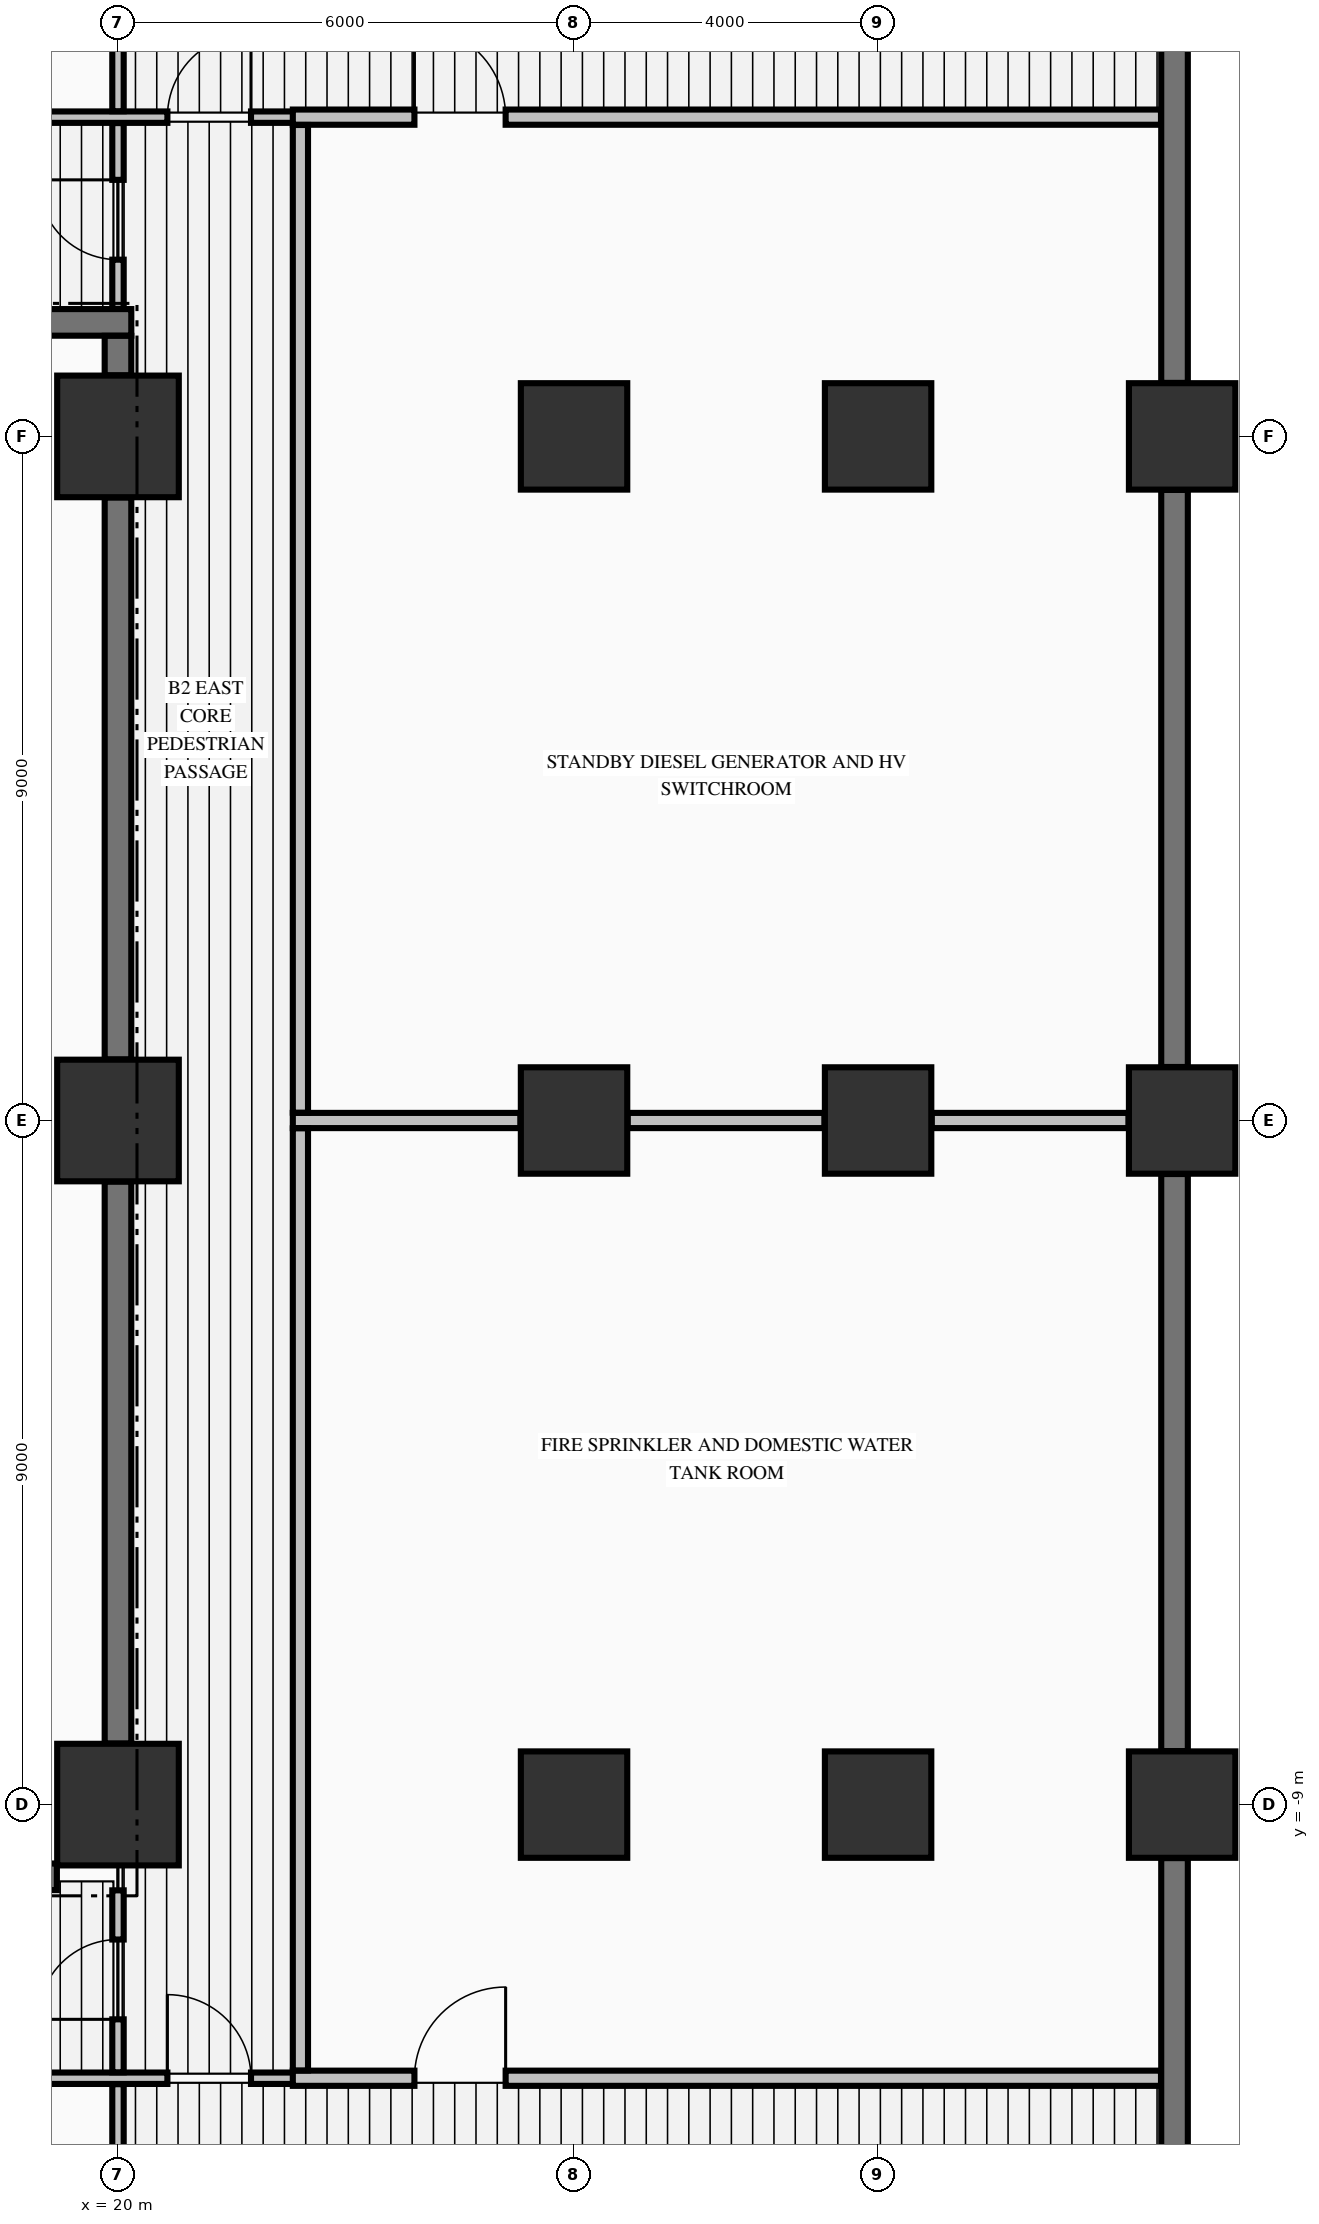
"""IFC4 building model, lengths in metres.
Left out: names, types, materials, properties, quantities, classifications, styles, units other than length and angle.
Written with IfcOpenShell. Run it as: python <this file> out.ifc"""

import sys

from ifc_helpers import new_model, si_unit, direction, frame, frame_2d, origin, origin_2d, place, context, subcontext, project, spatial, rectangle, extrude, element, fill, save


model = new_model("IFC4")
c1 = context("Model", 3, precision=1e-05, world=origin(), true_north=direction((0.0, 1.0)))
c2 = subcontext(c1, "Body", "Model", "MODEL_VIEW")
j1 = project(units=[si_unit("LENGTHUNIT", "METRE"), si_unit("PLANEANGLEUNIT", "RADIAN")], contexts=[c1])
p1 = place(None, origin())
s1 = spatial("IfcSite", under=j1, at=p1, CompositionType="ELEMENT")
p2 = place(p1, origin())
s2 = spatial("IfcBuilding", under=s1, at=p2, CompositionType="ELEMENT")
p3 = place(p2, frame((0.0, 0.0, -9.1)))
s3 = spatial("IfcBuildingStorey", under=s2, at=p3, CompositionType="ELEMENT", Elevation=-9.1)
for number, where, z_axis, x_axis in (
    (1, (20.0, -9.0, -0.45), (0.0, 0.0, 1.0), (1.0, 0.0, 0.0)),
    (2, (20.0, 0.0, -0.45), (0.0, 0.0, 1.0), (1.0, 0.0, 0.0)),
    (3, (20.0, 9.0, -0.45), (0.0, 0.0, 1.0), (1.0, 0.0, 0.0)),
):
    element("IfcColumn", number, at=place(p3, frame(where, z_axis=z_axis, x_axis=x_axis)), inside=s3, PredefinedType="COLUMN", context=c2, shape_type="SweptSolid", body=[
        extrude(rectangle(XDim=1.6, YDim=1.6, at=origin_2d()), origin(), (0.0, 0.0, 1.0), 4.65),
    ])
for number, where, z_axis, x_axis in (
    (4, (26.0, -9.0, -0.45), (0.0, 0.0, 1.0), (1.0, 0.0, 0.0)),
    (5, (26.0, 0.0, -0.45), (0.0, 0.0, 1.0), (1.0, 0.0, 0.0)),
    (6, (26.0, 9.0, -0.45), (0.0, 0.0, 1.0), (1.0, 0.0, 0.0)),
    (7, (30.0, -9.0, -0.45), (0.0, 0.0, 1.0), (1.0, 0.0, 0.0)),
    (8, (30.0, 0.0, -0.45), (0.0, 0.0, 1.0), (1.0, 0.0, 0.0)),
    (9, (30.0, 9.0, -0.45), (0.0, 0.0, 1.0), (1.0, 0.0, 0.0)),
    (10, (34.0, -9.0, -0.45), (0.0, 0.0, 1.0), (1.0, 0.0, 0.0)),
    (11, (34.0, 0.0, -0.45), (0.0, 0.0, 1.0), (1.0, 0.0, 0.0)),
    (12, (34.0, 9.0, -0.45), (0.0, 0.0, 1.0), (1.0, 0.0, 0.0)),
):
    element("IfcColumn", number, at=place(p3, frame(where, z_axis=z_axis, x_axis=x_axis)), inside=s3, PredefinedType="COLUMN", context=c2, shape_type="SweptSolid", body=[
        extrude(rectangle(XDim=1.4, YDim=1.4, at=origin_2d()), origin(), (0.0, 0.0, 1.0), 4.65),
    ])
p4 = place(p3, frame((14.7, -9.95, 0.0), z_axis=(0.0, 0.0, 1.0), x_axis=(1.0, 0.0, 0.0)))
e13 = element("IfcWall", 13, at=p4, inside=s3, PredefinedType="SHEAR", context=c2, shape_type="SweptSolid", body=[
    extrude(rectangle(XDim=4.496, YDim=0.35, at=frame_2d((2.248, 0.0))), origin(), (0.0, 0.0, 1.0), 4.2),
])
p5 = place(p3, frame((14.7, 10.5, 0.0), z_axis=(0.0, 0.0, 1.0), x_axis=(1.0, 0.0, 0.0)))
e14 = element("IfcWall", 14, at=p5, inside=s3, PredefinedType="SHEAR", context=c2, shape_type="SweptSolid", body=[
    extrude(rectangle(XDim=5.475, YDim=0.35, at=frame_2d((2.738, 0.0))), origin(), (0.0, 0.0, 1.0), 4.2),
])
p6 = place(p5, frame((2.1, 0.0, 0.0)))
e15 = element("IfcOpeningElement", 15, at=p6, cuts=e14, PredefinedType="OPENING", context=c2, shape_type="SweptSolid", body=[
    extrude(rectangle(XDim=1.1, YDim=2.15, at=frame_2d((0.55, 1.075))), frame((0.0, 0.185, 0.0), z_axis=(0.0, -1.0, 0.0), x_axis=(1.0, 0.0, 0.0)), (0.0, 0.0, 1.0), 0.37),
])
p7 = place(p3, frame((-33.722, -12.6, 0.0), z_axis=(0.0, 0.0, 1.0), x_axis=(1.0, 0.0, 0.0)))
e16 = element("IfcWall", 16, at=p7, inside=s3, PredefinedType="PARTITIONING", context=c2, shape_type="SweptSolid", body=[
    extrude(rectangle(XDim=56.222, YDim=0.15, at=frame_2d((28.111, 0.0))), origin(), (0.0, 0.0, 1.0), 3.74),
])
p8 = place(p7, frame((11.972, 0.0, 0.0)))
e17 = element("IfcOpeningElement", 17, at=p8, cuts=e16, PredefinedType="OPENING", context=c2, shape_type="SweptSolid", body=[
    extrude(rectangle(XDim=1.1, YDim=2.15, at=frame_2d((0.55, 1.075))), frame((0.0, 0.085, 0.0), z_axis=(0.0, -1.0, 0.0), x_axis=(1.0, 0.0, 0.0)), (0.0, 0.0, 1.0), 0.17),
])
p9 = place(p7, frame((54.372, 0.0, 0.0)))
e18 = element("IfcOpeningElement", 18, at=p9, cuts=e16, PredefinedType="OPENING", context=c2, shape_type="SweptSolid", body=[
    extrude(rectangle(XDim=1.1, YDim=2.15, at=frame_2d((0.55, 1.075))), frame((0.0, 0.085, 0.0), z_axis=(0.0, -1.0, 0.0), x_axis=(1.0, 0.0, 0.0)), (0.0, 0.0, 1.0), 0.17),
])
p10 = place(p7, frame((38.622, 0.0, 0.0)))
e19 = element("IfcOpeningElement", 19, at=p10, cuts=e16, PredefinedType="OPENING", context=c2, shape_type="SweptSolid", body=[
    extrude(rectangle(XDim=1.2, YDim=2.15, at=frame_2d((0.6, 1.075))), frame((0.0, 0.085, 0.0), z_axis=(0.0, -1.0, 0.0), x_axis=(1.0, 0.0, 0.0)), (0.0, 0.0, 1.0), 0.17),
])
p11 = place(p3, frame((22.3, -12.6, 0.0), z_axis=(0.0, 0.0, 1.0), x_axis=(1.0, 0.0, 0.0)))
e20 = element("IfcWall", 20, at=p11, inside=s3, PredefinedType="PARTITIONING", context=c2, shape_type="SweptSolid", body=[
    extrude(rectangle(XDim=11.422, YDim=0.2, at=frame_2d((5.711, 0.0))), origin(), (0.0, 0.0, 1.0), 3.74),
])
p12 = place(p11, frame((1.6, 0.0, 0.0)))
e21 = element("IfcOpeningElement", 21, at=p12, cuts=e20, PredefinedType="OPENING", context=c2, shape_type="SweptSolid", body=[
    extrude(rectangle(XDim=1.2, YDim=2.15, at=frame_2d((0.6, 1.075))), frame((0.0, 0.11, 0.0), z_axis=(0.0, -1.0, 0.0), x_axis=(1.0, 0.0, 0.0)), (0.0, 0.0, 1.0), 0.22),
])
p13 = place(p3, frame((22.3, 0.0, 0.0), z_axis=(0.0, 0.0, 1.0), x_axis=(1.0, 0.0, 0.0)))
e22 = element("IfcWall", 22, at=p13, inside=s3, PredefinedType="PARTITIONING", context=c2, shape_type="SweptSolid", body=[
    extrude(rectangle(XDim=2.994, YDim=0.2, at=frame_2d((1.497, 0.0))), origin(), (0.0, 0.0, 1.0), 3.242),
])
for number, where, z_axis, x_axis in (
    (23, (26.706, 0.0, 0.0), (0.0, 0.0, 1.0), (1.0, 0.0, 0.0)),
    (24, (30.706, 0.0, 0.0), (0.0, 0.0, 1.0), (1.0, 0.0, 0.0)),
):
    element("IfcWall", number, at=place(p3, frame(where, z_axis=z_axis, x_axis=x_axis)), inside=s3, PredefinedType="PARTITIONING", context=c2, shape_type="SweptSolid", body=[
        extrude(rectangle(XDim=2.588, YDim=0.2, at=frame_2d((1.294, 0.0))), origin(), (0.0, 0.0, 1.0), 3.242),
    ])
p14 = place(p3, frame((-22.5, 13.2, 0.0), z_axis=(0.0, 0.0, 1.0), x_axis=(1.0, 0.0, 0.0)))
e25 = element("IfcWall", 25, at=p14, inside=s3, PredefinedType="PARTITIONING", context=c2, shape_type="SweptSolid", body=[
    extrude(rectangle(XDim=45.0, YDim=0.15, at=frame_2d((22.5, 0.0))), origin(), (0.0, 0.0, 1.0), 4.2),
])
p15 = place(p14, frame((43.15, 0.0, 0.0)))
e26 = element("IfcOpeningElement", 26, at=p15, cuts=e25, PredefinedType="OPENING", context=c2, shape_type="SweptSolid", body=[
    extrude(rectangle(XDim=1.1, YDim=2.15, at=frame_2d((0.55, 1.075))), frame((0.0, 0.085, 0.0), z_axis=(0.0, -1.0, 0.0), x_axis=(1.0, 0.0, 0.0)), (0.0, 0.0, 1.0), 0.17),
])
p16 = place(p14, frame((27.4, 0.0, 0.0)))
e27 = element("IfcOpeningElement", 27, at=p16, cuts=e25, PredefinedType="OPENING", context=c2, shape_type="SweptSolid", body=[
    extrude(rectangle(XDim=1.2, YDim=2.15, at=frame_2d((0.6, 1.075))), frame((0.0, 0.085, 0.0), z_axis=(0.0, -1.0, 0.0), x_axis=(1.0, 0.0, 0.0)), (0.0, 0.0, 1.0), 0.17),
])
p17 = place(p3, frame((22.3, 13.2, 0.0), z_axis=(0.0, 0.0, 1.0), x_axis=(1.0, 0.0, 0.0)))
e28 = element("IfcWall", 28, at=p17, inside=s3, PredefinedType="PARTITIONING", context=c2, shape_type="SweptSolid", body=[
    extrude(rectangle(XDim=11.422, YDim=0.2, at=frame_2d((5.711, 0.0))), origin(), (0.0, 0.0, 1.0), 4.2),
])
p18 = place(p17, frame((1.6, 0.0, 0.0)))
e29 = element("IfcOpeningElement", 29, at=p18, cuts=e28, PredefinedType="OPENING", context=c2, shape_type="SweptSolid", body=[
    extrude(rectangle(XDim=1.2, YDim=2.15, at=frame_2d((0.6, 1.075))), frame((0.0, 0.11, 0.0), z_axis=(0.0, -1.0, 0.0), x_axis=(1.0, 0.0, 0.0)), (0.0, 0.0, 1.0), 0.22),
])
for number, where, z_axis, x_axis in (
    (30, (20.0, -8.196, 0.0), (0.0, 0.0, 1.0), (0.0, 1.0, 0.0)),
    (31, (20.0, 0.804, 0.0), (0.0, 0.0, 1.0), (0.0, 1.0, 0.0)),
):
    element("IfcWall", number, at=place(p3, frame(where, z_axis=z_axis, x_axis=x_axis)), inside=s3, PredefinedType="SHEAR", context=c2, shape_type="SweptSolid", body=[
        extrude(rectangle(XDim=7.392, YDim=0.35, at=frame_2d((3.696, 0.0))), origin(), (0.0, 0.0, 1.0), 4.2),
    ])
p19 = place(p3, frame((20.0, 9.804, 0.0), z_axis=(0.0, 0.0, 1.0), x_axis=(0.0, 1.0, 0.0)))
e32 = element("IfcWall", 32, at=p19, inside=s3, PredefinedType="SHEAR", context=c2, shape_type="SweptSolid", body=[
    extrude(rectangle(XDim=0.519, YDim=0.35, at=frame_2d((0.26, 0.0))), origin(), (0.0, 0.0, 1.0), 4.2),
])
p20 = place(p3, frame((33.9, -15.296, 0.0), z_axis=(0.0, 0.0, 1.0), x_axis=(0.0, 1.0, 0.0)))
e33 = element("IfcWall", 33, at=p20, inside=s3, PredefinedType="SHEAR", context=c2, shape_type="SweptSolid", body=[
    extrude(rectangle(XDim=5.592, YDim=0.35, at=frame_2d((2.796, 0.0))), origin(), (0.0, 0.0, 1.0), 4.2),
])
for number, where, z_axis, x_axis in (
    (34, (33.9, -8.296, 0.0), (0.0, 0.0, 1.0), (0.0, 1.0, 0.0)),
    (35, (33.9, 0.704, 0.0), (0.0, 0.0, 1.0), (0.0, 1.0, 0.0)),
):
    element("IfcWall", number, at=place(p3, frame(where, z_axis=z_axis, x_axis=x_axis)), inside=s3, PredefinedType="SHEAR", context=c2, shape_type="SweptSolid", body=[
        extrude(rectangle(XDim=7.592, YDim=0.35, at=frame_2d((3.796, 0.0))), origin(), (0.0, 0.0, 1.0), 4.2),
    ])
p21 = place(p3, frame((33.9, 9.704, 0.0), z_axis=(0.0, 0.0, 1.0), x_axis=(0.0, 1.0, 0.0)))
e36 = element("IfcWall", 36, at=p21, inside=s3, PredefinedType="SHEAR", context=c2, shape_type="SweptSolid", body=[
    extrude(rectangle(XDim=5.592, YDim=0.35, at=frame_2d((2.796, 0.0))), origin(), (0.0, 0.0, 1.0), 4.2),
])
p22 = place(p3, frame((20.0, -15.194, 0.0), z_axis=(0.0, 0.0, 1.0), x_axis=(0.0, 1.0, 0.0)))
e37 = element("IfcWall", 37, at=p22, inside=s3, PredefinedType="PARTITIONING", context=c2, shape_type="SweptSolid", body=[
    extrude(rectangle(XDim=2.516, YDim=0.15, at=frame_2d((1.258, 0.0))), origin(), (0.0, 0.0, 1.0), 3.242),
])
p23 = place(p3, frame((20.0, -12.522, 0.0), z_axis=(0.0, 0.0, 1.0), x_axis=(0.0, 1.0, 0.0)))
e38 = element("IfcWall", 38, at=p23, inside=s3, PredefinedType="PARTITIONING", context=c2, shape_type="SweptSolid", body=[
    extrude(rectangle(XDim=2.394, YDim=0.15, at=frame_2d((1.197, 0.0))), origin(), (0.0, 0.0, 1.0), 3.242),
])
p24 = place(p23, frame((0.697, 0.0, 0.0)))
e39 = element("IfcOpeningElement", 39, at=p24, cuts=e38, PredefinedType="OPENING", context=c2, shape_type="SweptSolid", body=[
    extrude(rectangle(XDim=1.05, YDim=2.15, at=frame_2d((0.525, 1.075))), frame((0.0, 0.085, 0.0), z_axis=(0.0, -1.0, 0.0), x_axis=(1.0, 0.0, 0.0)), (0.0, 0.0, 1.0), 0.17),
])
p25 = place(p3, frame((20.0, 10.678, 0.0), z_axis=(0.0, 0.0, 1.0), x_axis=(0.0, 1.0, 0.0)))
e40 = element("IfcWall", 40, at=p25, inside=s3, PredefinedType="PARTITIONING", context=c2, shape_type="SweptSolid", body=[
    extrude(rectangle(XDim=2.444, YDim=0.15, at=frame_2d((1.222, 0.0))), origin(), (0.0, 0.0, 1.0), 3.242),
])
p26 = place(p25, frame((0.647, 0.0, 0.0)))
e41 = element("IfcOpeningElement", 41, at=p26, cuts=e40, PredefinedType="OPENING", context=c2, shape_type="SweptSolid", body=[
    extrude(rectangle(XDim=1.05, YDim=2.15, at=frame_2d((0.525, 1.075))), frame((0.0, 0.085, 0.0), z_axis=(0.0, -1.0, 0.0), x_axis=(1.0, 0.0, 0.0)), (0.0, 0.0, 1.0), 0.17),
])
p27 = place(p3, frame((20.0, 13.278, 0.0), z_axis=(0.0, 0.0, 1.0), x_axis=(0.0, 1.0, 0.0)))
e42 = element("IfcWall", 42, at=p27, inside=s3, PredefinedType="PARTITIONING", context=c2, shape_type="SweptSolid", body=[
    extrude(rectangle(XDim=1.916, YDim=0.15, at=frame_2d((0.958, 0.0))), origin(), (0.0, 0.0, 1.0), 3.242),
])
p28 = place(p3, frame((22.4, -12.497, 0.0), z_axis=(0.0, 0.0, 1.0), x_axis=(0.0, 1.0, 0.0)))
e43 = element("IfcWall", 43, at=p28, inside=s3, PredefinedType="PARTITIONING", context=c2, shape_type="SweptSolid", body=[
    extrude(rectangle(XDim=12.394, YDim=0.2, at=frame_2d((6.197, 0.0))), origin(), (0.0, 0.0, 1.0), 4.2),
])
p29 = place(p3, frame((22.4, 0.103, 0.0), z_axis=(0.0, 0.0, 1.0), x_axis=(0.0, 1.0, 0.0)))
e44 = element("IfcWall", 44, at=p29, inside=s3, PredefinedType="PARTITIONING", context=c2, shape_type="SweptSolid", body=[
    extrude(rectangle(XDim=12.994, YDim=0.2, at=frame_2d((6.497, 0.0))), origin(), (0.0, 0.0, 1.0), 4.2),
])
p30 = place(p26, origin())
e45 = element("IfcDoor", 45, at=p30, inside=s3, OperationType="SINGLE_SWING_RIGHT", PredefinedType="DOOR", context=c2, shape_type="SweptSolid", body=[
    extrude(rectangle(XDim=1.05, YDim=2.15, at=frame_2d((0.525, 1.075))), frame((0.0, 0.025, 0.0), z_axis=(0.0, -1.0, 0.0), x_axis=(1.0, 0.0, 0.0)), (0.0, 0.0, 1.0), 0.05),
])
fill(e41, e45)
p31 = place(p24, origin())
e46 = element("IfcDoor", 46, at=p31, inside=s3, OperationType="SINGLE_SWING_LEFT", PredefinedType="DOOR", context=c2, shape_type="SweptSolid", body=[
    extrude(rectangle(XDim=1.05, YDim=2.15, at=frame_2d((0.525, 1.075))), frame((0.0, 0.025, 0.0), z_axis=(0.0, -1.0, 0.0), x_axis=(1.0, 0.0, 0.0)), (0.0, 0.0, 1.0), 0.05),
])
fill(e39, e46)
p32 = place(p15, origin())
e47 = element("IfcDoor", 47, at=p32, inside=s3, OperationType="SINGLE_SWING_RIGHT", PredefinedType="DOOR", context=c2, shape_type="SweptSolid", body=[
    extrude(rectangle(XDim=1.1, YDim=2.15, at=frame_2d((0.55, 1.075))), frame((0.0, 0.025, 0.0), z_axis=(0.0, -1.0, 0.0), x_axis=(1.0, 0.0, 0.0)), (0.0, 0.0, 1.0), 0.05),
])
fill(e26, e47)
p33 = place(p9, origin())
e48 = element("IfcDoor", 48, at=p33, inside=s3, OperationType="SINGLE_SWING_LEFT", PredefinedType="DOOR", context=c2, shape_type="SweptSolid", body=[
    extrude(rectangle(XDim=1.1, YDim=2.15, at=frame_2d((0.55, 1.075))), frame((0.0, 0.025, 0.0), z_axis=(0.0, -1.0, 0.0), x_axis=(1.0, 0.0, 0.0)), (0.0, 0.0, 1.0), 0.05),
])
fill(e18, e48)
p34 = place(p18, origin())
e49 = element("IfcDoor", 49, at=p34, inside=s3, OperationType="SINGLE_SWING_LEFT", PredefinedType="DOOR", context=c2, shape_type="SweptSolid", body=[
    extrude(rectangle(XDim=1.2, YDim=2.15, at=frame_2d((0.6, 1.075))), frame((0.0, 0.025, 0.0), z_axis=(0.0, -1.0, 0.0), x_axis=(1.0, 0.0, 0.0)), (0.0, 0.0, 1.0), 0.05),
])
fill(e29, e49)
p35 = place(p12, origin())
e50 = element("IfcDoor", 50, at=p35, inside=s3, OperationType="SINGLE_SWING_RIGHT", PredefinedType="DOOR", context=c2, shape_type="SweptSolid", body=[
    extrude(rectangle(XDim=1.2, YDim=2.15, at=frame_2d((0.6, 1.075))), frame((0.0, 0.025, 0.0), z_axis=(0.0, -1.0, 0.0), x_axis=(1.0, 0.0, 0.0)), (0.0, 0.0, 1.0), 0.05),
])
fill(e21, e50)
save(model, sys.argv[1])
